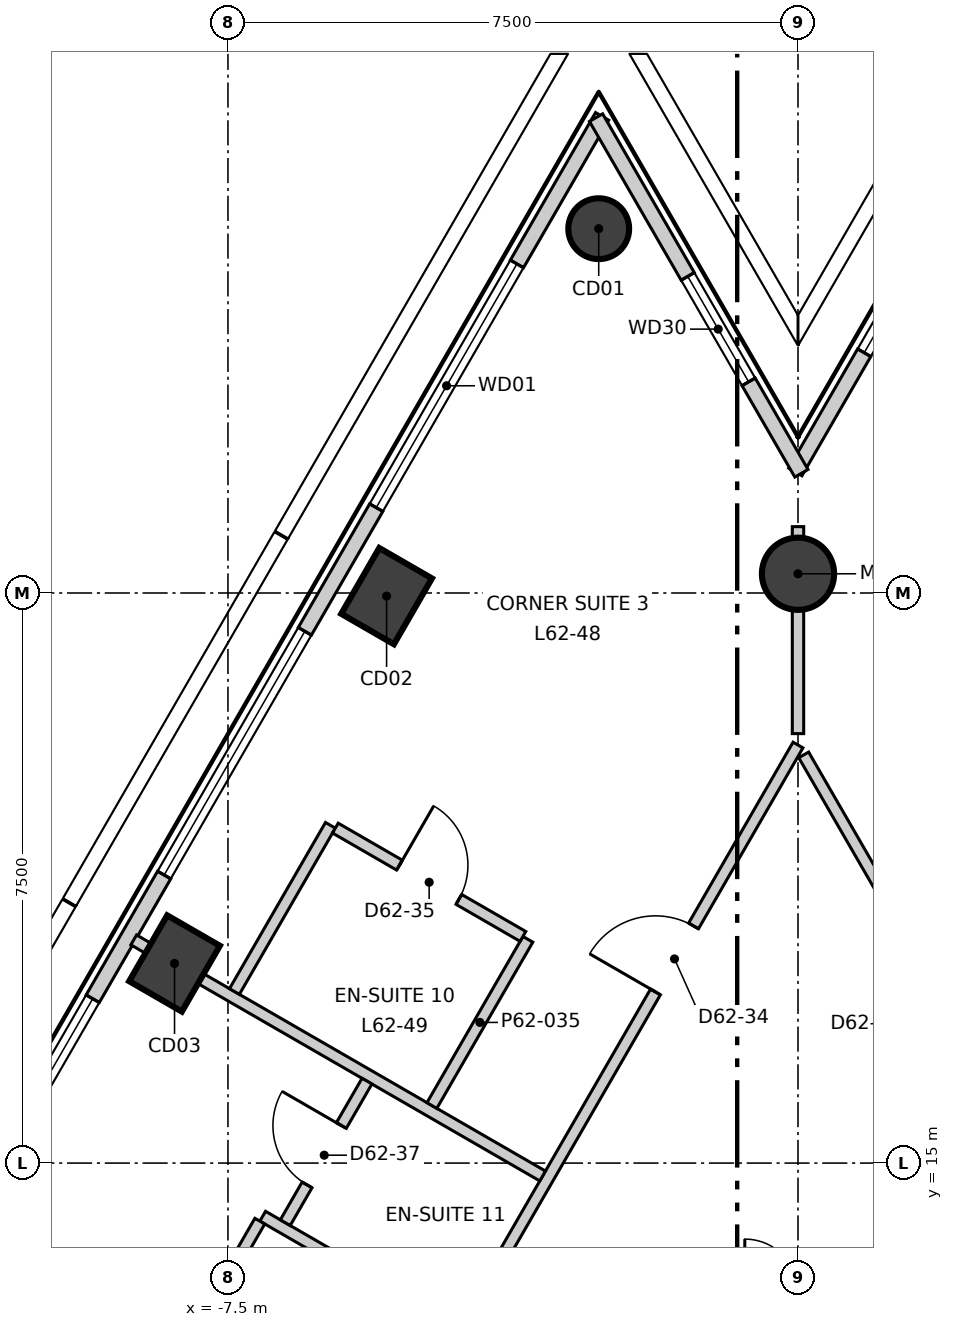
"""IFC4 building model, lengths in metres.
Left out: names, types, materials, properties, quantities, classifications, styles, units other than length and angle.
Written with IfcOpenShell. Run it as: python <this file> out.ifc"""

import sys

from ifc_helpers import new_model, si_unit, direction, frame, frame_2d, origin, origin_2d, place, context, subcontext, project, spatial, rectangle, circle, extrude, element, fill, save


model = new_model("IFC4")
c1 = context("Model", 3, precision=1e-05, world=origin(), true_north=direction((0.0, 1.0)))
c2 = subcontext(c1, "Body", "Model", "MODEL_VIEW")
j1 = project(units=[si_unit("LENGTHUNIT", "METRE"), si_unit("PLANEANGLEUNIT", "RADIAN")], contexts=[c1])
p1 = place(None, origin())
s1 = spatial("IfcSite", under=j1, at=p1, CompositionType="ELEMENT")
p2 = place(p1, origin())
s2 = spatial("IfcBuilding", under=s1, at=p2, CompositionType="ELEMENT")
p3 = place(p2, frame((0.0, 0.0, 268.3)))
s3 = spatial("IfcBuildingStorey", under=s2, at=p3, CompositionType="ELEMENT", Elevation=268.3)
p4 = place(p3, frame((-2.622, 27.293, -0.3), z_axis=(0.0, 0.0, 1.0), x_axis=(0.5, 0.866025403784, 0.0)))
e1 = element("IfcColumn", 1, at=p4, inside=s3, PredefinedType="COLUMN", context=c2, shape_type="SweptSolid", body=[
    extrude(circle(Radius=0.4, at=origin_2d()), origin(), (0.0, 0.0, 1.0), 3.6),
])
for number, where, z_axis, x_axis in (
    (2, (-5.413, 22.459, -0.3), (0.0, 0.0, 1.0), (0.5, 0.866, 0.0)),
    (3, (-8.203, 17.626, -0.3), (0.0, 0.0, 1.0), (0.5, 0.866, 0.0)),
):
    element("IfcColumn", number, at=place(p3, frame(where, z_axis=z_axis, x_axis=x_axis)), inside=s3, PredefinedType="COLUMN", context=c2, shape_type="SweptSolid", body=[
        extrude(rectangle(XDim=1.0, YDim=0.8, at=origin_2d()), origin(), (0.0, 0.0, 1.0), 3.6),
    ])
p5 = place(p3, frame((0.0, 22.753, -0.3), z_axis=(0.0, 0.0, 1.0), x_axis=(1.0, 0.0, 0.0)))
e4 = element("IfcColumn", 4, at=p5, inside=s3, PredefinedType="COLUMN", context=c2, shape_type="SweptSolid", body=[
    extrude(circle(Radius=0.475, at=origin_2d()), origin(), (0.0, 0.0, 1.0), 3.6),
])
p6 = place(p3, frame((-2.577, 28.771, 0.0), z_axis=(0.0, 0.0, 1.0), x_axis=(-0.49999909388, -0.866025926932, 0.0)))
e5 = element("IfcWall", 5, at=p6, inside=s3, PredefinedType="ELEMENTEDWALL", context=c2, shape_type="SweptSolid", body=[
    extrude(rectangle(XDim=47.236, YDim=0.2, at=frame_2d((23.618, 0.0))), origin(), (0.0, 0.0, 1.0), 3.3),
])
p7 = place(p6, frame((2.243, 0.0, 0.9)))
e6 = element("IfcOpeningElement", 6, at=p7, cuts=e5, PredefinedType="OPENING", context=c2, shape_type="SweptSolid", body=[
    extrude(rectangle(XDim=3.7, YDim=2.2, at=frame_2d((1.85, 1.1))), frame((0.0, 0.11, 0.0), z_axis=(0.0, -1.0, 0.0), x_axis=(1.0, 0.0, 0.0)), (0.0, 0.0, 1.0), 0.22),
])
p8 = place(p6, frame((7.824, 0.0, 0.9)))
e7 = element("IfcOpeningElement", 7, at=p8, cuts=e5, PredefinedType="OPENING", context=c2, shape_type="SweptSolid", body=[
    extrude(rectangle(XDim=3.7, YDim=2.2, at=frame_2d((1.85, 1.1))), frame((0.0, 0.11, 0.0), z_axis=(0.0, -1.0, 0.0), x_axis=(1.0, 0.0, 0.0)), (0.0, 0.0, 1.0), 0.22),
])
p9 = place(p6, frame((13.406, 0.0, 0.9)))
e8 = element("IfcOpeningElement", 8, at=p9, cuts=e5, PredefinedType="OPENING", context=c2, shape_type="SweptSolid", body=[
    extrude(rectangle(XDim=3.7, YDim=2.2, at=frame_2d((1.85, 1.1))), frame((0.0, 0.11, 0.0), z_axis=(0.0, -1.0, 0.0), x_axis=(1.0, 0.0, 0.0)), (0.0, 0.0, 1.0), 0.22),
])
p10 = place(p6, frame((18.987, 0.0, 0.9)))
e9 = element("IfcOpeningElement", 9, at=p10, cuts=e5, PredefinedType="OPENING", context=c2, shape_type="SweptSolid", body=[
    extrude(rectangle(XDim=3.7, YDim=2.2, at=frame_2d((1.85, 1.1))), frame((0.0, 0.11, 0.0), z_axis=(0.0, -1.0, 0.0), x_axis=(1.0, 0.0, 0.0)), (0.0, 0.0, 1.0), 0.22),
])
p11 = place(p6, frame((24.569, 0.0, 0.9)))
e10 = element("IfcOpeningElement", 10, at=p11, cuts=e5, PredefinedType="OPENING", context=c2, shape_type="SweptSolid", body=[
    extrude(rectangle(XDim=3.7, YDim=2.2, at=frame_2d((1.85, 1.1))), frame((0.0, 0.11, 0.0), z_axis=(0.0, -1.0, 0.0), x_axis=(1.0, 0.0, 0.0)), (0.0, 0.0, 1.0), 0.22),
])
p12 = place(p6, frame((30.15, 0.0, 0.9)))
e11 = element("IfcOpeningElement", 11, at=p12, cuts=e5, PredefinedType="OPENING", context=c2, shape_type="SweptSolid", body=[
    extrude(rectangle(XDim=3.7, YDim=2.2, at=frame_2d((1.85, 1.1))), frame((0.0, 0.11, 0.0), z_axis=(0.0, -1.0, 0.0), x_axis=(1.0, 0.0, 0.0)), (0.0, 0.0, 1.0), 0.22),
])
p13 = place(p6, frame((35.731, 0.0, 0.9)))
e12 = element("IfcOpeningElement", 12, at=p13, cuts=e5, PredefinedType="OPENING", context=c2, shape_type="SweptSolid", body=[
    extrude(rectangle(XDim=3.7, YDim=2.2, at=frame_2d((1.85, 1.1))), frame((0.0, 0.11, 0.0), z_axis=(0.0, -1.0, 0.0), x_axis=(1.0, 0.0, 0.0)), (0.0, 0.0, 1.0), 0.22),
])
p14 = place(p6, frame((41.313, 0.0, 0.9)))
e13 = element("IfcOpeningElement", 13, at=p14, cuts=e5, PredefinedType="OPENING", context=c2, shape_type="SweptSolid", body=[
    extrude(rectangle(XDim=3.7, YDim=2.2, at=frame_2d((1.85, 1.1))), frame((0.0, 0.11, 0.0), z_axis=(0.0, -1.0, 0.0), x_axis=(1.0, 0.0, 0.0)), (0.0, 0.0, 1.0), 0.22),
])
p15 = place(p3, frame((2.667, 28.771, 0.0), z_axis=(0.0, 0.0, 1.0), x_axis=(-0.500070558953, -0.865984662721, 0.0)))
e14 = element("IfcWall", 14, at=p15, inside=s3, PredefinedType="ELEMENTEDWALL", context=c2, shape_type="SweptSolid", body=[
    extrude(rectangle(XDim=5.403, YDim=0.2, at=frame_2d((2.702, 0.0))), origin(), (0.0, 0.0, 1.0), 3.3),
])
p16 = place(p15, frame((1.99, 0.0, 0.9)))
e15 = element("IfcOpeningElement", 15, at=p16, cuts=e14, PredefinedType="OPENING", context=c2, shape_type="SweptSolid", body=[
    extrude(rectangle(XDim=1.6, YDim=2.2, at=frame_2d((0.8, 1.1))), frame((0.0, 0.11, 0.0), z_axis=(0.0, -1.0, 0.0), x_axis=(1.0, 0.0, 0.0)), (0.0, 0.0, 1.0), 0.22),
])
p17 = place(p3, frame((0.045, 24.075, 0.0), z_axis=(0.0, 0.0, 1.0), x_axis=(-0.500070558953, 0.865984662721, 0.0)))
e16 = element("IfcWall", 16, at=p17, inside=s3, PredefinedType="ELEMENTEDWALL", context=c2, shape_type="SweptSolid", body=[
    extrude(rectangle(XDim=5.403, YDim=0.2, at=frame_2d((2.702, 0.0))), origin(), (0.0, 0.0, 1.0), 3.3),
])
p18 = place(p17, frame((1.39, 0.0, 0.9)))
e17 = element("IfcOpeningElement", 17, at=p18, cuts=e16, PredefinedType="OPENING", context=c2, shape_type="SweptSolid", body=[
    extrude(rectangle(XDim=1.6, YDim=2.2, at=frame_2d((0.8, 1.1))), frame((0.0, 0.11, 0.0), z_axis=(0.0, -1.0, 0.0), x_axis=(1.0, 0.0, 0.0)), (0.0, 0.0, 1.0), 0.22),
])
p19 = place(p3, frame((-17.678, -10.12, 0.0), z_axis=(0.0, 0.0, 1.0), x_axis=(0.49998824015, 0.86603219323, 0.0)))
e18 = element("IfcWall", 18, at=p19, inside=s3, PredefinedType="PARTITIONING", context=c2, shape_type="SweptSolid", body=[
    extrude(rectangle(XDim=35.357, YDim=0.15, at=frame_2d((17.678, 0.0))), origin(), (0.0, 0.0, 1.0), 3.3),
])
p20 = place(p19, frame((31.607, 0.0, 0.0)))
e19 = element("IfcOpeningElement", 19, at=p20, cuts=e18, PredefinedType="OPENING", context=c2, shape_type="SweptSolid", body=[
    extrude(rectangle(XDim=1.0, YDim=2.1, at=frame_2d((0.5, 1.05))), frame((0.0, 0.085, 0.0), z_axis=(0.0, -1.0, 0.0), x_axis=(1.0, 0.0, 0.0)), (0.0, 0.0, 1.0), 0.17),
])
p21 = place(p19, frame((19.416, 0.0, 0.0)))
e20 = element("IfcOpeningElement", 20, at=p21, cuts=e18, PredefinedType="OPENING", context=c2, shape_type="SweptSolid", body=[
    extrude(rectangle(XDim=1.0, YDim=2.1, at=frame_2d((0.5, 1.05))), frame((0.0, 0.085, 0.0), z_axis=(0.0, -1.0, 0.0), x_axis=(1.0, 0.0, 0.0)), (0.0, 0.0, 1.0), 0.17),
])
p22 = place(p19, frame((24.916, 0.0, 0.0)))
e21 = element("IfcOpeningElement", 21, at=p22, cuts=e18, PredefinedType="OPENING", context=c2, shape_type="SweptSolid", body=[
    extrude(rectangle(XDim=0.9, YDim=2.1, at=frame_2d((0.45, 1.05))), frame((0.0, 0.085, 0.0), z_axis=(0.0, -1.0, 0.0), x_axis=(1.0, 0.0, 0.0)), (0.0, 0.0, 1.0), 0.17),
])
p23 = place(p19, frame((22.816, 0.0, 0.0)))
e22 = element("IfcOpeningElement", 22, at=p23, cuts=e18, PredefinedType="OPENING", context=c2, shape_type="SweptSolid", body=[
    extrude(rectangle(XDim=0.9, YDim=2.1, at=frame_2d((0.45, 1.05))), frame((0.0, 0.085, 0.0), z_axis=(0.0, -1.0, 0.0), x_axis=(1.0, 0.0, 0.0)), (0.0, 0.0, 1.0), 0.17),
])
p24 = place(p19, frame((14.654, 0.0, 0.0)))
e23 = element("IfcOpeningElement", 23, at=p24, cuts=e18, PredefinedType="OPENING", context=c2, shape_type="SweptSolid", body=[
    extrude(rectangle(XDim=1.0, YDim=2.1, at=frame_2d((0.5, 1.05))), frame((0.0, 0.085, 0.0), z_axis=(0.0, -1.0, 0.0), x_axis=(1.0, 0.0, 0.0)), (0.0, 0.0, 1.0), 0.17),
])
p25 = place(p19, frame((7.672, 0.0, 0.0)))
e24 = element("IfcOpeningElement", 24, at=p25, cuts=e18, PredefinedType="OPENING", context=c2, shape_type="SweptSolid", body=[
    extrude(rectangle(XDim=1.0, YDim=2.1, at=frame_2d((0.5, 1.05))), frame((0.0, 0.085, 0.0), z_axis=(0.0, -1.0, 0.0), x_axis=(1.0, 0.0, 0.0)), (0.0, 0.0, 1.0), 0.17),
])
p26 = place(p19, frame((2.69, 0.0, 0.0)))
e25 = element("IfcOpeningElement", 25, at=p26, cuts=e18, PredefinedType="OPENING", context=c2, shape_type="SweptSolid", body=[
    extrude(rectangle(XDim=1.0, YDim=2.1, at=frame_2d((0.5, 1.05))), frame((0.0, 0.085, 0.0), z_axis=(0.0, -1.0, 0.0), x_axis=(1.0, 0.0, 0.0)), (0.0, 0.0, 1.0), 0.17),
])
p27 = place(p3, frame((-8.74, 17.936, 0.0), z_axis=(0.0, 0.0, 1.0), x_axis=(0.866033751423, -0.499985541187, 0.0)))
e26 = element("IfcWall", 26, at=p27, inside=s3, PredefinedType="PARTITIONING", context=c2, shape_type="SweptSolid", body=[
    extrude(rectangle(XDim=6.212, YDim=0.15, at=frame_2d((3.106, 0.0))), origin(), (0.0, 0.0, 1.0), 3.3),
])
p28 = place(p3, frame((-7.043, 14.301, 0.0), z_axis=(0.0, 0.0, 1.0), x_axis=(0.865917290158, -0.500187211558, 0.0)))
e27 = element("IfcWall", 27, at=p28, inside=s3, PredefinedType="PARTITIONING", context=c2, shape_type="SweptSolid", body=[
    extrude(rectangle(XDim=2.925, YDim=0.15, at=frame_2d((1.463, 0.0))), origin(), (0.0, 0.0, 1.0), 3.3),
])
p29 = place(p3, frame((-8.143, 12.395, 0.0), z_axis=(0.0, 0.0, 1.0), x_axis=(0.499672732084, 0.866214269573, 0.0)))
e28 = element("IfcWall", 28, at=p29, inside=s3, PredefinedType="PARTITIONING", context=c2, shape_type="SweptSolid", body=[
    extrude(rectangle(XDim=2.125, YDim=0.15, at=frame_2d((1.063, 0.0))), origin(), (0.0, 0.0, 1.0), 3.3),
])
p30 = place(p3, frame((0.0, 20.65, 0.0), z_axis=(0.0, 0.0, 1.0), x_axis=(0.0, 1.0, 0.0)))
e29 = element("IfcWall", 29, at=p30, inside=s3, PredefinedType="PARTITIONING", context=c2, shape_type="SweptSolid", body=[
    extrude(rectangle(XDim=2.723, YDim=0.15, at=frame_2d((1.362, 0.0))), origin(), (0.0, 0.0, 1.0), 2.8),
])
p31 = place(p3, frame((0.075, 20.37, 0.0), z_axis=(0.0, 0.0, 1.0), x_axis=(0.499988971979, -0.866031770721, 0.0)))
e30 = element("IfcWall", 30, at=p31, inside=s3, PredefinedType="PARTITIONING", context=c2, shape_type="SweptSolid", body=[
    extrude(rectangle(XDim=35.207, YDim=0.15, at=frame_2d((17.604, 0.0))), origin(), (0.0, 0.0, 1.0), 3.3),
])
p32 = place(p31, frame((31.606, 0.0, 0.0)))
e31 = element("IfcOpeningElement", 31, at=p32, cuts=e30, PredefinedType="OPENING", context=c2, shape_type="SweptSolid", body=[
    extrude(rectangle(XDim=1.0, YDim=2.1, at=frame_2d((0.5, 1.05))), frame((0.0, 0.085, 0.0), z_axis=(0.0, -1.0, 0.0), x_axis=(1.0, 0.0, 0.0)), (0.0, 0.0, 1.0), 0.17),
])
p33 = place(p31, frame((24.316, 0.0, 0.0)))
e32 = element("IfcOpeningElement", 32, at=p33, cuts=e30, PredefinedType="OPENING", context=c2, shape_type="SweptSolid", body=[
    extrude(rectangle(XDim=1.0, YDim=2.1, at=frame_2d((0.5, 1.05))), frame((0.0, 0.085, 0.0), z_axis=(0.0, -1.0, 0.0), x_axis=(1.0, 0.0, 0.0)), (0.0, 0.0, 1.0), 0.17),
])
p34 = place(p31, frame((18.735, 0.0, 0.0)))
e33 = element("IfcOpeningElement", 33, at=p34, cuts=e30, PredefinedType="OPENING", context=c2, shape_type="SweptSolid", body=[
    extrude(rectangle(XDim=1.0, YDim=2.1, at=frame_2d((0.5, 1.05))), frame((0.0, 0.085, 0.0), z_axis=(0.0, -1.0, 0.0), x_axis=(1.0, 0.0, 0.0)), (0.0, 0.0, 1.0), 0.17),
])
p35 = place(p31, frame((8.154, 0.0, 0.0)))
e34 = element("IfcOpeningElement", 34, at=p35, cuts=e30, PredefinedType="OPENING", context=c2, shape_type="SweptSolid", body=[
    extrude(rectangle(XDim=1.0, YDim=2.1, at=frame_2d((0.5, 1.05))), frame((0.0, 0.085, 0.0), z_axis=(0.0, -1.0, 0.0), x_axis=(1.0, 0.0, 0.0)), (0.0, 0.0, 1.0), 0.17),
])
p36 = place(p31, frame((13.754, 0.0, 0.0)))
e35 = element("IfcOpeningElement", 35, at=p36, cuts=e30, PredefinedType="OPENING", context=c2, shape_type="SweptSolid", body=[
    extrude(rectangle(XDim=0.9, YDim=2.1, at=frame_2d((0.45, 1.05))), frame((0.0, 0.085, 0.0), z_axis=(0.0, -1.0, 0.0), x_axis=(1.0, 0.0, 0.0)), (0.0, 0.0, 1.0), 0.17),
])
p37 = place(p31, frame((11.554, 0.0, 0.0)))
e36 = element("IfcOpeningElement", 36, at=p37, cuts=e30, PredefinedType="OPENING", context=c2, shape_type="SweptSolid", body=[
    extrude(rectangle(XDim=0.9, YDim=2.1, at=frame_2d((0.45, 1.05))), frame((0.0, 0.085, 0.0), z_axis=(0.0, -1.0, 0.0), x_axis=(1.0, 0.0, 0.0)), (0.0, 0.0, 1.0), 0.17),
])
p38 = place(p31, frame((2.69, 0.0, 0.0)))
e37 = element("IfcOpeningElement", 37, at=p38, cuts=e30, PredefinedType="OPENING", context=c2, shape_type="SweptSolid", body=[
    extrude(rectangle(XDim=1.0, YDim=2.1, at=frame_2d((0.5, 1.05))), frame((0.0, 0.085, 0.0), z_axis=(0.0, -1.0, 0.0), x_axis=(1.0, 0.0, 0.0)), (0.0, 0.0, 1.0), 0.17),
])
for number, where, z_axis, x_axis in (
    (38, (-4.817, 15.757, 0.0), (0.0, 0.0, 1.0), (0.5, 0.866, 0.0)),
    (39, (-7.415, 17.257, 0.0), (0.0, 0.0, 1.0), (0.5, 0.866, 0.0)),
):
    element("IfcWall", number, at=place(p3, frame(where, z_axis=z_axis, x_axis=x_axis)), inside=s3, PredefinedType="PARTITIONING", context=c2, shape_type="SweptSolid", body=[
        extrude(rectangle(XDim=2.525, YDim=0.15, at=frame_2d((1.263, 0.0))), origin(), (0.0, 0.0, 1.0), 3.3),
    ])
p39 = place(p3, frame((-6.746, 14.216, 0.0), z_axis=(0.0, 0.0, 1.0), x_axis=(0.500095966228, 0.865969990567, 0.0)))
e40 = element("IfcWall", 40, at=p39, inside=s3, PredefinedType="PARTITIONING", context=c2, shape_type="SweptSolid", body=[
    extrude(rectangle(XDim=2.15, YDim=0.15, at=frame_2d((1.075, 0.0))), origin(), (0.0, 0.0, 1.0), 3.3),
])
p40 = place(p39, frame((0.575, 0.0, 0.0)))
e41 = element("IfcOpeningElement", 41, at=p40, cuts=e40, PredefinedType="OPENING", context=c2, shape_type="SweptSolid", body=[
    extrude(rectangle(XDim=0.9, YDim=2.1, at=frame_2d((0.45, 1.05))), frame((0.0, 0.085, 0.0), z_axis=(0.0, -1.0, 0.0), x_axis=(1.0, 0.0, 0.0)), (0.0, 0.0, 1.0), 0.17),
])
p41 = place(p3, frame((-6.087, 19.407, 0.0), z_axis=(0.0, 0.0, 1.0), x_axis=(0.866004402611, -0.500036373335, 0.0)))
e42 = element("IfcWall", 42, at=p41, inside=s3, PredefinedType="PARTITIONING", context=c2, shape_type="SweptSolid", body=[
    extrude(rectangle(XDim=2.85, YDim=0.15, at=frame_2d((1.425, 0.0))), origin(), (0.0, 0.0, 1.0), 3.3),
])
p42 = place(p41, frame((0.975, 0.0, 0.0)))
e43 = element("IfcOpeningElement", 43, at=p42, cuts=e42, PredefinedType="OPENING", context=c2, shape_type="SweptSolid", body=[
    extrude(rectangle(XDim=0.9, YDim=2.1, at=frame_2d((0.45, 1.05))), frame((0.0, 0.085, 0.0), z_axis=(0.0, -1.0, 0.0), x_axis=(1.0, 0.0, 0.0)), (0.0, 0.0, 1.0), 0.17),
])
p43 = place(p7, origin())
e44 = element("IfcWindow", 44, at=p43, inside=s3, PartitioningType="SINGLE_PANEL", PredefinedType="WINDOW", context=c2, shape_type="SweptSolid", body=[
    extrude(rectangle(XDim=3.7, YDim=2.2, at=frame_2d((1.85, 1.1))), frame((0.0, 0.03, 0.0), z_axis=(0.0, -1.0, 0.0), x_axis=(1.0, 0.0, 0.0)), (0.0, 0.0, 1.0), 0.06),
])
fill(e6, e44)
p44 = place(p8, origin())
e45 = element("IfcWindow", 45, at=p44, inside=s3, PartitioningType="SINGLE_PANEL", PredefinedType="WINDOW", context=c2, shape_type="SweptSolid", body=[
    extrude(rectangle(XDim=3.7, YDim=2.2, at=frame_2d((1.85, 1.1))), frame((0.0, 0.03, 0.0), z_axis=(0.0, -1.0, 0.0), x_axis=(1.0, 0.0, 0.0)), (0.0, 0.0, 1.0), 0.06),
])
fill(e7, e45)
p45 = place(p9, origin())
e46 = element("IfcWindow", 46, at=p45, inside=s3, PartitioningType="SINGLE_PANEL", PredefinedType="WINDOW", context=c2, shape_type="SweptSolid", body=[
    extrude(rectangle(XDim=3.7, YDim=2.2, at=frame_2d((1.85, 1.1))), frame((0.0, 0.03, 0.0), z_axis=(0.0, -1.0, 0.0), x_axis=(1.0, 0.0, 0.0)), (0.0, 0.0, 1.0), 0.06),
])
fill(e8, e46)
p46 = place(p16, origin())
e47 = element("IfcWindow", 47, at=p46, inside=s3, PartitioningType="SINGLE_PANEL", PredefinedType="WINDOW", context=c2, shape_type="SweptSolid", body=[
    extrude(rectangle(XDim=1.6, YDim=2.2, at=frame_2d((0.8, 1.1))), frame((0.0, 0.03, 0.0), z_axis=(0.0, -1.0, 0.0), x_axis=(1.0, 0.0, 0.0)), (0.0, 0.0, 1.0), 0.06),
])
fill(e15, e47)
p47 = place(p18, origin())
e48 = element("IfcWindow", 48, at=p47, inside=s3, PartitioningType="SINGLE_PANEL", PredefinedType="WINDOW", context=c2, shape_type="SweptSolid", body=[
    extrude(rectangle(XDim=1.6, YDim=2.2, at=frame_2d((0.8, 1.1))), frame((0.0, 0.03, 0.0), z_axis=(0.0, -1.0, 0.0), x_axis=(1.0, 0.0, 0.0)), (0.0, 0.0, 1.0), 0.06),
])
fill(e17, e48)
p48 = place(p20, origin())
e49 = element("IfcDoor", 49, at=p48, inside=s3, OperationType="SINGLE_SWING_RIGHT", PredefinedType="DOOR", context=c2, shape_type="SweptSolid", body=[
    extrude(rectangle(XDim=1.0, YDim=2.1, at=frame_2d((0.5, 1.05))), frame((0.0, 0.025, 0.0), z_axis=(0.0, -1.0, 0.0), x_axis=(1.0, 0.0, 0.0)), (0.0, 0.0, 1.0), 0.05),
])
fill(e19, e49)
p49 = place(p42, origin())
e50 = element("IfcDoor", 50, at=p49, inside=s3, OperationType="SINGLE_SWING_RIGHT", PredefinedType="DOOR", context=c2, shape_type="SweptSolid", body=[
    extrude(rectangle(XDim=0.9, YDim=2.1, at=frame_2d((0.45, 1.05))), frame((0.0, 0.025, 0.0), z_axis=(0.0, -1.0, 0.0), x_axis=(1.0, 0.0, 0.0)), (0.0, 0.0, 1.0), 0.05),
])
fill(e43, e50)
p50 = place(p40, origin())
e51 = element("IfcDoor", 51, at=p50, inside=s3, OperationType="SINGLE_SWING_LEFT", PredefinedType="DOOR", context=c2, shape_type="SweptSolid", body=[
    extrude(rectangle(XDim=0.9, YDim=2.1, at=frame_2d((0.45, 1.05))), frame((0.0, 0.025, 0.0), z_axis=(0.0, -1.0, 0.0), x_axis=(1.0, 0.0, 0.0)), (0.0, 0.0, 1.0), 0.05),
])
fill(e41, e51)
save(model, sys.argv[1])
